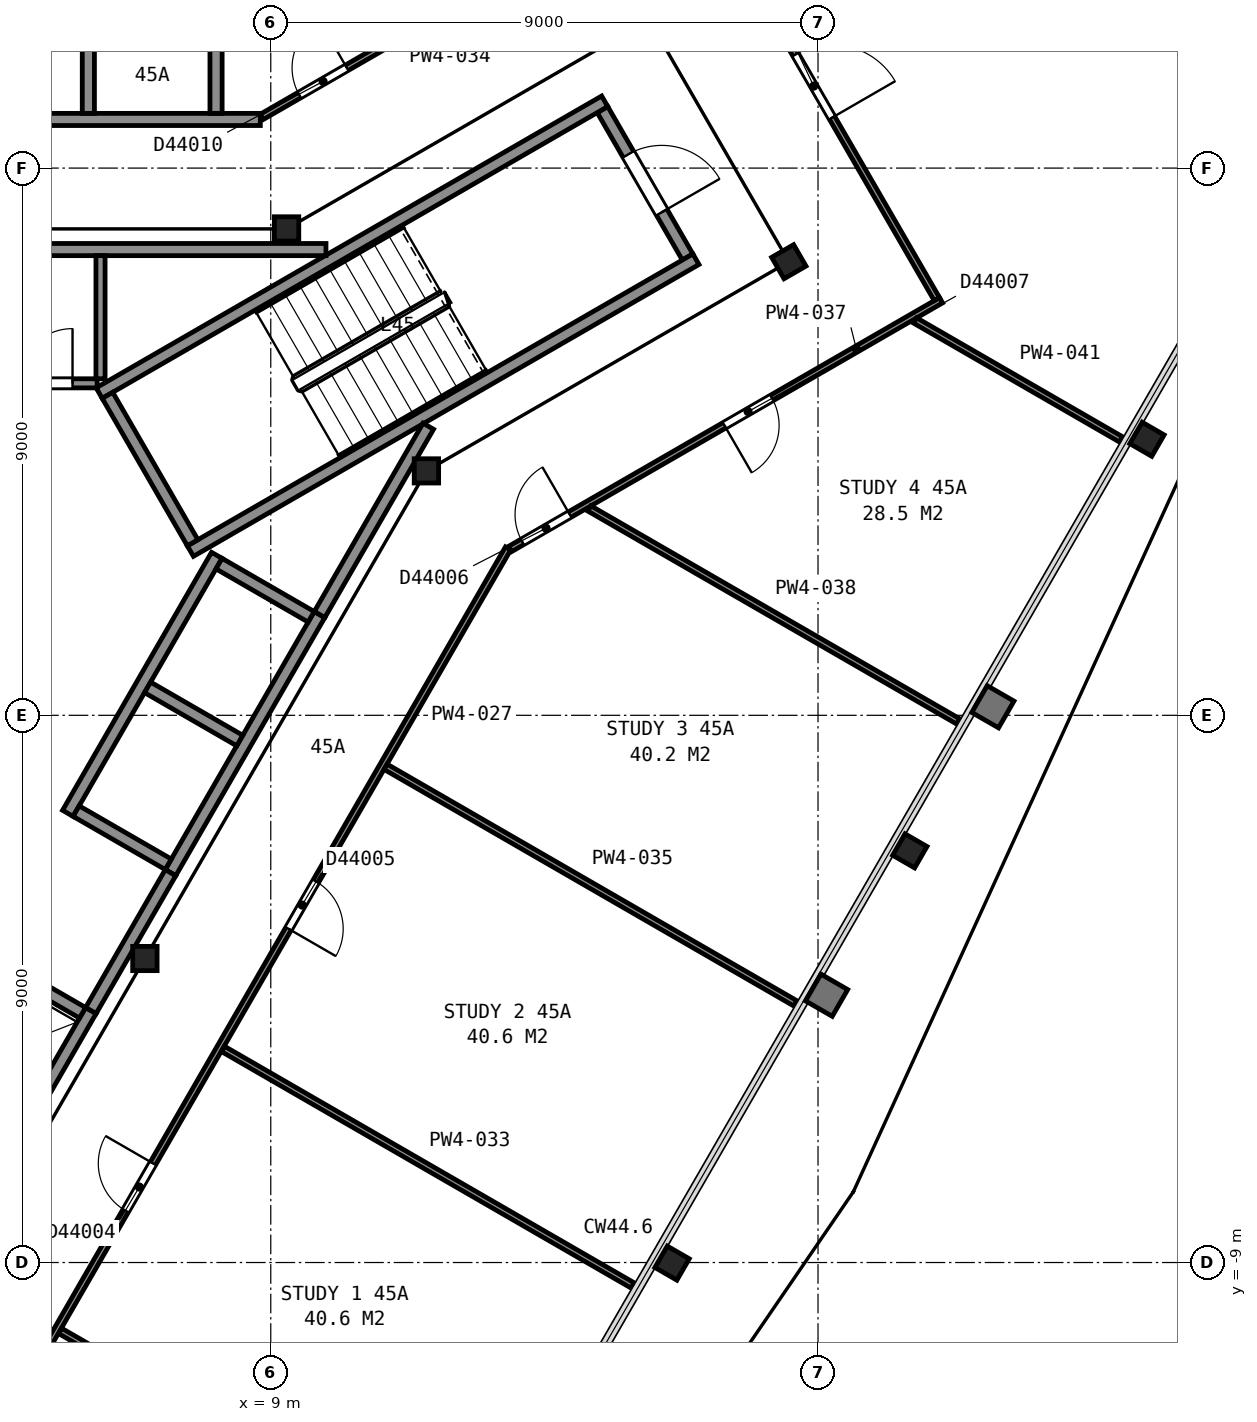
"""IFC4 building model, lengths in metres.
Left out: names, types, materials, properties, quantities, classifications, styles, units other than length and angle.
Written with IfcOpenShell. Run it as: python <this file> out.ifc"""

import sys

from ifc_helpers import new_model, si_unit, direction, frame, frame_2d, origin, origin_2d, place, context, subcontext, project, spatial, rectangle, i_section, extrude, element, fill, save


model = new_model("IFC4")
c1 = context("Model", 3, precision=1e-05, world=origin(), true_north=direction((0.0, 1.0)))
c2 = subcontext(c1, "Body", "Model", "MODEL_VIEW")
j1 = project(units=[si_unit("LENGTHUNIT", "METRE"), si_unit("PLANEANGLEUNIT", "RADIAN")], contexts=[c1])
p1 = place(None, origin())
s1 = spatial("IfcSite", under=j1, at=p1, CompositionType="ELEMENT")
p2 = place(p1, origin())
s2 = spatial("IfcBuilding", under=s1, at=p2, CompositionType="ELEMENT")
p3 = place(p2, frame((0.0, 0.0, 182.1)))
s3 = spatial("IfcBuildingStorey", under=s2, at=p3, CompositionType="ELEMENT", Elevation=182.1)
p4 = place(p3, frame((15.6, -9.01, 0.0), z_axis=(0.0, 0.0, 1.0), x_axis=(-0.5, -0.866025403784, 0.0)))
e1 = element("IfcColumn", 1, at=p4, inside=s3, PredefinedType="COLUMN", context=c2, shape_type="SweptSolid", body=[
    extrude(i_section(OverallWidth=0.406, OverallDepth=0.417, WebThickness=0.03, FlangeThickness=0.048, FilletRadius=0.015, at=origin_2d()), origin(), (0.0, 0.0, 1.0), 3.67),
])
p5 = place(p3, frame((19.51, -2.23, 0.0), z_axis=(0.0, 0.0, 1.0), x_axis=(-0.5, -0.866025403784, 0.0)))
e2 = element("IfcColumn", 2, at=p5, inside=s3, PredefinedType="COLUMN", context=c2, shape_type="SweptSolid", body=[
    extrude(i_section(OverallWidth=0.406, OverallDepth=0.417, WebThickness=0.03, FlangeThickness=0.048, FilletRadius=0.015, at=origin_2d()), origin(), (0.0, 0.0, 1.0), 3.665),
])
p6 = place(p3, frame((23.41, 4.54, 0.0), z_axis=(0.0, 0.0, 1.0), x_axis=(-0.5, -0.866025403784, 0.0)))
e3 = element("IfcColumn", 3, at=p6, inside=s3, PredefinedType="COLUMN", context=c2, shape_type="SweptSolid", body=[
    extrude(i_section(OverallWidth=0.406, OverallDepth=0.417, WebThickness=0.03, FlangeThickness=0.048, FilletRadius=0.015, at=origin_2d()), origin(), (0.0, 0.0, 1.0), 3.66),
])
p7 = place(p3, frame((11.56, 4.02, 0.0), z_axis=(0.0, 0.0, 1.0), x_axis=(1.0, 0.0, 0.0)))
e4 = element("IfcColumn", 4, at=p7, inside=s3, PredefinedType="COLUMN", context=c2, shape_type="SweptSolid", body=[
    extrude(i_section(OverallWidth=0.401, OverallDepth=0.399, WebThickness=0.025, FlangeThickness=0.04, FilletRadius=0.015, at=origin_2d()), origin(), (0.0, 0.0, 1.0), 3.7),
])
p8 = place(p3, frame((17.52, 7.46, 0.0), z_axis=(0.0, 0.0, 1.0), x_axis=(0.5, -0.866025403784, 0.0)))
e5 = element("IfcColumn", 5, at=p8, inside=s3, PredefinedType="COLUMN", context=c2, shape_type="SweptSolid", body=[
    extrude(i_section(OverallWidth=0.406, OverallDepth=0.417, WebThickness=0.03, FlangeThickness=0.048, FilletRadius=0.015, at=origin_2d()), origin(), (0.0, 0.0, 1.0), 3.7),
])
for number, where, z_axis, x_axis in (
    (6, (9.26, 8.0, 0.0), (0.0, 0.0, 1.0), (1.0, 0.0, 0.0)),
    (7, (6.93, -4.0, 0.0), (0.0, 0.0, 1.0), (1.0, 0.0, 0.0)),
):
    element("IfcColumn", number, at=place(p3, frame(where, z_axis=z_axis, x_axis=x_axis)), inside=s3, PredefinedType="COLUMN", context=c2, shape_type="SweptSolid", body=[
        extrude(i_section(OverallWidth=0.401, OverallDepth=0.399, WebThickness=0.025, FlangeThickness=0.04, FilletRadius=0.015, at=origin_2d()), origin(), (0.0, 0.0, 1.0), 3.7),
    ])
p9 = place(p3, frame((15.855, 7.538, 0.0), z_axis=(0.0, 0.0, 1.0), x_axis=(-0.500049511043, 0.865996816683, 0.0)))
e8 = element("IfcWall", 8, at=p9, inside=s3, PredefinedType="PARTITIONING", context=c2, shape_type="SweptSolid", body=[
    extrude(rectangle(XDim=2.8, YDim=0.2, at=frame_2d((1.4, 0.0))), origin(), (0.0, 0.0, 1.0), 3.45),
])
p10 = place(p9, frame((0.85, 0.0, 0.0)))
e9 = element("IfcOpeningElement", 9, at=p10, cuts=e8, PredefinedType="OPENING", context=c2, shape_type="SweptSolid", body=[
    extrude(rectangle(XDim=1.1, YDim=2.1, at=frame_2d((0.55, 1.05))), frame((0.0, 0.11, 0.0), z_axis=(0.0, -1.0, 0.0), x_axis=(1.0, 0.0, 0.0)), (0.0, 0.0, 1.0), 0.22),
])
for number, where, z_axis, x_axis in (
    (10, (6.178, 5.299, 0.0), (0.0, 0.0, 1.0), (0.866, 0.5, 0.0)),
    (11, (7.678, 2.701, 0.0), (0.0, 0.0, 1.0), (0.866, 0.5, 0.0)),
):
    element("IfcWall", number, at=place(p3, frame(where, z_axis=z_axis, x_axis=x_axis)), inside=s3, PredefinedType="PARTITIONING", context=c2, shape_type="SweptSolid", body=[
        extrude(rectangle(XDim=9.6, YDim=0.2, at=frame_2d((4.8, 0.0))), origin(), (0.0, 0.0, 1.0), 3.45),
    ])
p11 = place(p3, frame((7.715, 2.838, 0.0), z_axis=(0.0, 0.0, 1.0), x_axis=(-0.500049511043, 0.865996816683, 0.0)))
e12 = element("IfcWall", 12, at=p11, inside=s3, PredefinedType="PARTITIONING", context=c2, shape_type="SweptSolid", body=[
    extrude(rectangle(XDim=2.8, YDim=0.2, at=frame_2d((1.4, 0.0))), origin(), (0.0, 0.0, 1.0), 3.45),
])
p12 = place(p3, frame((4.766, -7.065, 0.0), z_axis=(0.0, 0.0, 1.0), x_axis=(0.499948979701, 0.866054858364, 0.0)))
e13 = element("IfcWall", 13, at=p12, inside=s3, PredefinedType="PARTITIONING", context=c2, shape_type="SweptSolid", body=[
    extrude(rectangle(XDim=2.55, YDim=0.2, at=frame_2d((1.275, 0.0))), origin(), (0.0, 0.0, 1.0), 3.7),
])
p13 = place(p3, frame((7.351, -2.587, 0.0), z_axis=(0.0, 0.0, 1.0), x_axis=(0.500002801628, 0.866023786258, 0.0)))
e14 = element("IfcWall", 14, at=p13, inside=s3, PredefinedType="PARTITIONING", context=c2, shape_type="SweptSolid", body=[
    extrude(rectangle(XDim=4.9, YDim=0.2, at=frame_2d((2.45, 0.0))), origin(), (0.0, 0.0, 1.0), 3.7),
])
p14 = place(p3, frame((5.663, -1.612, 0.0), z_axis=(0.0, 0.0, 1.0), x_axis=(0.49998122708, 0.866036242063, 0.0)))
e15 = element("IfcWall", 15, at=p14, inside=s3, PredefinedType="PARTITIONING", context=c2, shape_type="SweptSolid", body=[
    extrude(rectangle(XDim=4.9, YDim=0.2, at=frame_2d((2.45, 0.0))), origin(), (0.0, 0.0, 1.0), 3.7),
])
p15 = place(p3, frame((9.665, 1.62, 0.0), z_axis=(0.0, 0.0, 1.0), x_axis=(-0.866002029911, 0.500040482552, 0.0)))
e16 = element("IfcWall", 16, at=p15, inside=s3, PredefinedType="PARTITIONING", context=c2, shape_type="SweptSolid", body=[
    extrude(rectangle(XDim=1.75, YDim=0.2, at=frame_2d((0.875, 0.0))), origin(), (0.0, 0.0, 1.0), 3.7),
])
for number, where, z_axis, x_axis in (
    (17, (8.49, -0.416, 0.0), (0.0, 0.0, 1.0), (-0.866, 0.5, 0.0)),
    (18, (7.315, -2.451, 0.0), (0.0, 0.0, 1.0), (-0.866, 0.5, 0.0)),
):
    element("IfcWall", number, at=place(p3, frame(where, z_axis=z_axis, x_axis=x_axis)), inside=s3, PredefinedType="PARTITIONING", context=c2, shape_type="SweptSolid", body=[
        extrude(rectangle(XDim=1.75, YDim=0.2, at=frame_2d((0.875, 0.0))), origin(), (0.0, 0.0, 1.0), 3.7),
    ])
p16 = place(p3, frame((5.905, -4.893, 0.0), z_axis=(0.0, 0.0, 1.0), x_axis=(-0.866002029911, 0.500040482552, 0.0)))
e19 = element("IfcWall", 19, at=p16, inside=s3, PredefinedType="PARTITIONING", context=c2, shape_type="SweptSolid", body=[
    extrude(rectangle(XDim=1.75, YDim=0.2, at=frame_2d((0.875, 0.0))), origin(), (0.0, 0.0, 1.0), 3.7),
])
p17 = place(p3, frame((-3.933, 7.66, 0.0), z_axis=(0.0, 0.0, 1.0), x_axis=(1.0, 0.0, 0.0)))
e20 = element("IfcWall", 20, at=p17, inside=s3, PredefinedType="PARTITIONING", context=c2, shape_type="SweptSolid", body=[
    extrude(rectangle(XDim=13.841, YDim=0.2, at=frame_2d((6.92, 0.0))), origin(), (0.0, 0.0, 1.0), 3.45),
])
p18 = place(p3, frame((0.925, 5.46, 0.0), z_axis=(0.0, 0.0, 1.0), x_axis=(1.0, 0.0, 0.0)))
e21 = element("IfcWall", 21, at=p18, inside=s3, PredefinedType="PARTITIONING", context=c2, shape_type="SweptSolid", body=[
    extrude(rectangle(XDim=5.22, YDim=0.15, at=frame_2d((2.61, 0.0))), origin(), (0.0, 0.0, 1.0), 3.45),
])
p19 = place(p18, frame((3.915, 0.0, 0.0)))
e22 = element("IfcOpeningElement", 22, at=p19, cuts=e21, PredefinedType="OPENING", context=c2, shape_type="SweptSolid", body=[
    extrude(rectangle(XDim=0.9, YDim=2.1, at=frame_2d((0.45, 1.05))), frame((0.0, 0.085, 0.0), z_axis=(0.0, -1.0, 0.0), x_axis=(1.0, 0.0, 0.0)), (0.0, 0.0, 1.0), 0.17),
])
p20 = place(p3, frame((6.042, -4.855, 0.0), z_axis=(0.0, 0.0, 1.0), x_axis=(0.500252727967, 0.865879442048, 0.0)))
e23 = element("IfcWall", 23, at=p20, inside=s3, PredefinedType="PARTITIONING", context=c2, shape_type="SweptSolid", body=[
    extrude(rectangle(XDim=2.617, YDim=0.2, at=frame_2d((1.309, 0.0))), origin(), (0.0, 0.0, 1.0), 3.45),
])
p21 = place(p3, frame((6.2, 5.535, 0.0), z_axis=(0.0, 0.0, 1.0), x_axis=(0.0, 1.0, 0.0)))
e24 = element("IfcWall", 24, at=p21, inside=s3, PredefinedType="PARTITIONING", context=c2, shape_type="SweptSolid", body=[
    extrude(rectangle(XDim=2.025, YDim=0.15, at=frame_2d((1.013, 0.0))), origin(), (0.0, 0.0, 1.0), 3.45),
])
p22 = place(p3, frame((9.803, 1.658, 0.0), z_axis=(0.0, 0.0, 1.0), x_axis=(0.499943114462, 0.866058244174, 0.0)))
e25 = element("IfcWall", 25, at=p22, inside=s3, PredefinedType="PARTITIONING", context=c2, shape_type="SweptSolid", body=[
    extrude(rectangle(XDim=3.576, YDim=0.2, at=frame_2d((1.788, 0.0))), origin(), (0.0, 0.0, 1.0), 3.45),
])
p23 = place(p3, frame((-8.828, 9.8, 0.0), z_axis=(0.0, 0.0, 1.0), x_axis=(1.0, 0.0, 0.0)))
e26 = element("IfcWall", 26, at=p23, inside=s3, PredefinedType="PARTITIONING", context=c2, shape_type="SweptSolid", body=[
    extrude(rectangle(XDim=17.656, YDim=0.2, at=frame_2d((8.828, 0.0))), origin(), (0.0, 0.0, 1.0), 2.713),
])
p24 = place(p23, frame((11.723, 0.0, 0.0)))
e27 = element("IfcOpeningElement", 27, at=p24, cuts=e26, PredefinedType="OPENING", context=c2, shape_type="SweptSolid", body=[
    extrude(rectangle(XDim=0.9, YDim=2.1, at=frame_2d((0.45, 1.05))), frame((0.0, 0.11, 0.0), z_axis=(0.0, -1.0, 0.0), x_axis=(1.0, 0.0, 0.0)), (0.0, 0.0, 1.0), 0.22),
])
p25 = place(p23, frame((6.367, 0.0, 0.0)))
e28 = element("IfcOpeningElement", 28, at=p25, cuts=e26, PredefinedType="OPENING", context=c2, shape_type="SweptSolid", body=[
    extrude(rectangle(XDim=0.9, YDim=2.1, at=frame_2d((0.45, 1.05))), frame((0.0, 0.11, 0.0), z_axis=(0.0, -1.0, 0.0), x_axis=(1.0, 0.0, 0.0)), (0.0, 0.0, 1.0), 0.22),
])
p26 = place(p3, frame((12.903, 2.745, 0.0), z_axis=(0.0, 0.0, 1.0), x_axis=(-0.499997333799, -0.866026943111, 0.0)))
e29 = element("IfcWall", 29, at=p26, inside=s3, PredefinedType="PARTITIONING", context=c2, shape_type="SweptSolid", body=[
    extrude(rectangle(XDim=17.606, YDim=0.1, at=frame_2d((8.803, 0.0))), origin(), (0.0, 0.0, 1.0), 2.713),
])
p27 = place(p26, frame((15.756, 0.0, 0.0)))
e30 = element("IfcOpeningElement", 30, at=p27, cuts=e29, PredefinedType="OPENING", context=c2, shape_type="SweptSolid", body=[
    extrude(rectangle(XDim=0.9, YDim=2.1, at=frame_2d((0.45, 1.05))), frame((0.0, 0.06, 0.0), z_axis=(0.0, -1.0, 0.0), x_axis=(1.0, 0.0, 0.0)), (0.0, 0.0, 1.0), 0.12),
])
p28 = place(p26, frame((11.679, 0.0, 0.0)))
e31 = element("IfcOpeningElement", 31, at=p28, cuts=e29, PredefinedType="OPENING", context=c2, shape_type="SweptSolid", body=[
    extrude(rectangle(XDim=0.9, YDim=2.1, at=frame_2d((0.45, 1.05))), frame((0.0, 0.06, 0.0), z_axis=(0.0, -1.0, 0.0), x_axis=(1.0, 0.0, 0.0)), (0.0, 0.0, 1.0), 0.12),
])
p29 = place(p26, frame((6.324, 0.0, 0.0)))
e32 = element("IfcOpeningElement", 32, at=p29, cuts=e29, PredefinedType="OPENING", context=c2, shape_type="SweptSolid", body=[
    extrude(rectangle(XDim=0.9, YDim=2.1, at=frame_2d((0.45, 1.05))), frame((0.0, 0.06, 0.0), z_axis=(0.0, -1.0, 0.0), x_axis=(1.0, 0.0, 0.0)), (0.0, 0.0, 1.0), 0.12),
])
p30 = place(p3, frame((5.536, -10.125, 0.0), z_axis=(0.0, 0.0, 1.0), x_axis=(0.866044474677, -0.49996696679, 0.0)))
e33 = element("IfcWall", 33, at=p30, inside=s3, PredefinedType="PARTITIONING", context=c2, shape_type="SweptSolid", body=[
    extrude(rectangle(XDim=7.779, YDim=0.1, at=frame_2d((3.889, 0.0))), origin(), (0.0, 0.0, 1.0), 2.713),
])
p31 = place(p3, frame((6.0, 9.9, 0.0), z_axis=(0.0, 0.0, 1.0), x_axis=(0.0, 1.0, 0.0)))
e34 = element("IfcWall", 34, at=p31, inside=s3, PredefinedType="PARTITIONING", context=c2, shape_type="SweptSolid", body=[
    extrude(rectangle(XDim=7.735, YDim=0.2, at=frame_2d((3.868, 0.0))), origin(), (0.0, 0.0, 1.0), 2.713),
])
p32 = place(p3, frame((8.1, 9.9, 0.0), z_axis=(0.0, 0.0, 1.0), x_axis=(0.0, 1.0, 0.0)))
e35 = element("IfcWall", 35, at=p32, inside=s3, PredefinedType="PARTITIONING", context=c2, shape_type="SweptSolid", body=[
    extrude(rectangle(XDim=2.842, YDim=0.2, at=frame_2d((1.421, 0.0))), origin(), (0.0, 0.0, 1.0), 2.713),
])
p33 = place(p3, frame((8.214, -5.487, 0.0), z_axis=(0.0, 0.0, 1.0), x_axis=(0.866007344409, -0.500031278452, 0.0)))
e36 = element("IfcWall", 36, at=p33, inside=s3, PredefinedType="PARTITIONING", context=c2, shape_type="SweptSolid", body=[
    extrude(rectangle(XDim=7.778, YDim=0.1, at=frame_2d((3.889, 0.0))), origin(), (0.0, 0.0, 1.0), 2.713),
])
p34 = place(p3, frame((8.852, 9.843, 0.0), z_axis=(0.0, 0.0, 1.0), x_axis=(0.866088973199, 0.499889878377, 0.0)))
e37 = element("IfcWall", 37, at=p34, inside=s3, PredefinedType="PARTITIONING", context=c2, shape_type="SweptSolid", body=[
    extrude(rectangle(XDim=8.163, YDim=0.1, at=frame_2d((4.082, 0.0))), origin(), (0.0, 0.0, 1.0), 2.713),
])
p35 = place(p34, frame((4.583, 0.0, 0.0)))
e38 = element("IfcOpeningElement", 38, at=p35, cuts=e37, PredefinedType="OPENING", context=c2, shape_type="SweptSolid", body=[
    extrude(rectangle(XDim=0.9, YDim=2.1, at=frame_2d((0.45, 1.05))), frame((0.0, 0.06, 0.0), z_axis=(0.0, -1.0, 0.0), x_axis=(1.0, 0.0, 0.0)), (0.0, 0.0, 1.0), 0.12),
])
p36 = place(p34, frame((0.715, 0.0, 0.0)))
e39 = element("IfcOpeningElement", 39, at=p36, cuts=e37, PredefinedType="OPENING", context=c2, shape_type="SweptSolid", body=[
    extrude(rectangle(XDim=0.9, YDim=2.1, at=frame_2d((0.45, 1.05))), frame((0.0, 0.06, 0.0), z_axis=(0.0, -1.0, 0.0), x_axis=(1.0, 0.0, 0.0)), (0.0, 0.0, 1.0), 0.12),
])
p37 = place(p3, frame((10.887, -0.846, 0.0), z_axis=(0.0, 0.0, 1.0), x_axis=(0.866004841997, -0.500035612369, 0.0)))
e40 = element("IfcWall", 40, at=p37, inside=s3, PredefinedType="PARTITIONING", context=c2, shape_type="SweptSolid", body=[
    extrude(rectangle(XDim=7.783, YDim=0.1, at=frame_2d((3.892, 0.0))), origin(), (0.0, 0.0, 1.0), 2.713),
])
p38 = place(p3, frame((20.023, 6.826, 0.0), z_axis=(0.0, 0.0, 1.0), x_axis=(-0.866097124975, -0.499875754673, 0.0)))
e41 = element("IfcWall", 41, at=p38, inside=s3, PredefinedType="PARTITIONING", context=c2, shape_type="SweptSolid", body=[
    extrude(rectangle(XDim=8.18, YDim=0.1, at=frame_2d((4.09, 0.0))), origin(), (0.0, 0.0, 1.0), 2.713),
])
p39 = place(p38, frame((7.05, 0.0, 0.0)))
e42 = element("IfcOpeningElement", 42, at=p39, cuts=e41, PredefinedType="OPENING", context=c2, shape_type="SweptSolid", body=[
    extrude(rectangle(XDim=0.9, YDim=2.1, at=frame_2d((0.45, 1.05))), frame((0.0, 0.06, 0.0), z_axis=(0.0, -1.0, 0.0), x_axis=(1.0, 0.0, 0.0)), (0.0, 0.0, 1.0), 0.12),
])
p40 = place(p38, frame((3.214, 0.0, 0.0)))
e43 = element("IfcOpeningElement", 43, at=p40, cuts=e41, PredefinedType="OPENING", context=c2, shape_type="SweptSolid", body=[
    extrude(rectangle(XDim=0.9, YDim=2.1, at=frame_2d((0.45, 1.05))), frame((0.0, 0.06, 0.0), z_axis=(0.0, -1.0, 0.0), x_axis=(1.0, 0.0, 0.0)), (0.0, 0.0, 1.0), 0.12),
])
p41 = place(p3, frame((14.24, 3.402, 0.0), z_axis=(0.0, 0.0, 1.0), x_axis=(0.866018390239, -0.500012147621, 0.0)))
e44 = element("IfcWall", 44, at=p41, inside=s3, PredefinedType="PARTITIONING", context=c2, shape_type="SweptSolid", body=[
    extrude(rectangle(XDim=7.003, YDim=0.1, at=frame_2d((3.501, 0.0))), origin(), (0.0, 0.0, 1.0), 2.713),
])
p42 = place(p3, frame((15.903, 13.855, 0.0), z_axis=(0.0, 0.0, 1.0), x_axis=(0.500415732313, -0.865785247537, 0.0)))
e45 = element("IfcWall", 45, at=p42, inside=s3, PredefinedType="PARTITIONING", context=c2, shape_type="SweptSolid", body=[
    extrude(rectangle(XDim=8.097, YDim=0.1, at=frame_2d((4.049, 0.0))), origin(), (0.0, 0.0, 1.0), 2.713),
])
p43 = place(p42, frame((3.45, 0.0, 0.0)))
e46 = element("IfcOpeningElement", 46, at=p43, cuts=e45, PredefinedType="OPENING", context=c2, shape_type="SweptSolid", body=[
    extrude(rectangle(XDim=1.2, YDim=2.1, at=frame_2d((0.6, 1.05))), frame((0.0, 0.06, 0.0), z_axis=(0.0, -1.0, 0.0), x_axis=(1.0, 0.0, 0.0)), (0.0, 0.0, 1.0), 0.12),
])
p44 = place(p3, frame((19.596, 6.494, 0.0), z_axis=(0.0, 0.0, 1.0), x_axis=(0.865998449813, -0.500046682742, 0.0)))
e47 = element("IfcWall", 47, at=p44, inside=s3, PredefinedType="PARTITIONING", context=c2, shape_type="SweptSolid", body=[
    extrude(rectangle(XDim=3.911, YDim=0.1, at=frame_2d((1.956, 0.0))), origin(), (0.0, 0.0, 1.0), 2.713),
])
p45 = place(p10, origin())
e48 = element("IfcDoor", 48, at=p45, inside=s3, OperationType="SINGLE_SWING_LEFT", PredefinedType="DOOR", context=c2, shape_type="SweptSolid", body=[
    extrude(rectangle(XDim=1.1, YDim=2.1, at=frame_2d((0.55, 1.05))), frame((0.0, 0.025, 0.0), z_axis=(0.0, -1.0, 0.0), x_axis=(1.0, 0.0, 0.0)), (0.0, 0.0, 1.0), 0.05),
])
fill(e9, e48)
p46 = place(p19, origin())
e49 = element("IfcDoor", 49, at=p46, inside=s3, OperationType="SINGLE_SWING_RIGHT", PredefinedType="DOOR", context=c2, shape_type="SweptSolid", body=[
    extrude(rectangle(XDim=0.9, YDim=2.1, at=frame_2d((0.45, 1.05))), frame((0.0, 0.025, 0.0), z_axis=(0.0, -1.0, 0.0), x_axis=(1.0, 0.0, 0.0)), (0.0, 0.0, 1.0), 0.05),
])
fill(e22, e49)
p47 = place(p28, origin())
e50 = element("IfcDoor", 50, at=p47, inside=s3, OperationType="SINGLE_SWING_LEFT", PredefinedType="DOOR", context=c2, shape_type="SweptSolid", body=[
    extrude(rectangle(XDim=0.9, YDim=2.1, at=frame_2d((0.45, 1.05))), frame((0.0, 0.025, 0.0), z_axis=(0.0, -1.0, 0.0), x_axis=(1.0, 0.0, 0.0)), (0.0, 0.0, 1.0), 0.05),
])
fill(e31, e50)
p48 = place(p29, origin())
e51 = element("IfcDoor", 51, at=p48, inside=s3, OperationType="SINGLE_SWING_RIGHT", PredefinedType="DOOR", context=c2, shape_type="SweptSolid", body=[
    extrude(rectangle(XDim=0.9, YDim=2.1, at=frame_2d((0.45, 1.05))), frame((0.0, 0.025, 0.0), z_axis=(0.0, -1.0, 0.0), x_axis=(1.0, 0.0, 0.0)), (0.0, 0.0, 1.0), 0.05),
])
fill(e32, e51)
p49 = place(p36, origin())
e52 = element("IfcDoor", 52, at=p49, inside=s3, OperationType="SINGLE_SWING_RIGHT", PredefinedType="DOOR", context=c2, shape_type="SweptSolid", body=[
    extrude(rectangle(XDim=0.9, YDim=2.1, at=frame_2d((0.45, 1.05))), frame((0.0, 0.025, 0.0), z_axis=(0.0, -1.0, 0.0), x_axis=(1.0, 0.0, 0.0)), (0.0, 0.0, 1.0), 0.05),
])
fill(e39, e52)
p50 = place(p39, origin())
e53 = element("IfcDoor", 53, at=p50, inside=s3, OperationType="SINGLE_SWING_LEFT", PredefinedType="DOOR", context=c2, shape_type="SweptSolid", body=[
    extrude(rectangle(XDim=0.9, YDim=2.1, at=frame_2d((0.45, 1.05))), frame((0.0, 0.025, 0.0), z_axis=(0.0, -1.0, 0.0), x_axis=(1.0, 0.0, 0.0)), (0.0, 0.0, 1.0), 0.05),
])
fill(e42, e53)
p51 = place(p40, origin())
e54 = element("IfcDoor", 54, at=p51, inside=s3, OperationType="SINGLE_SWING_RIGHT", PredefinedType="DOOR", context=c2, shape_type="SweptSolid", body=[
    extrude(rectangle(XDim=0.9, YDim=2.1, at=frame_2d((0.45, 1.05))), frame((0.0, 0.025, 0.0), z_axis=(0.0, -1.0, 0.0), x_axis=(1.0, 0.0, 0.0)), (0.0, 0.0, 1.0), 0.05),
])
fill(e43, e54)
p52 = place(p43, origin())
e55 = element("IfcDoor", 55, at=p52, inside=s3, OperationType="SINGLE_SWING_RIGHT", PredefinedType="DOOR", context=c2, shape_type="SweptSolid", body=[
    extrude(rectangle(XDim=1.2, YDim=2.1, at=frame_2d((0.6, 1.05))), frame((0.0, 0.025, 0.0), z_axis=(0.0, -1.0, 0.0), x_axis=(1.0, 0.0, 0.0)), (0.0, 0.0, 1.0), 0.05),
])
fill(e46, e55)
save(model, sys.argv[1])
